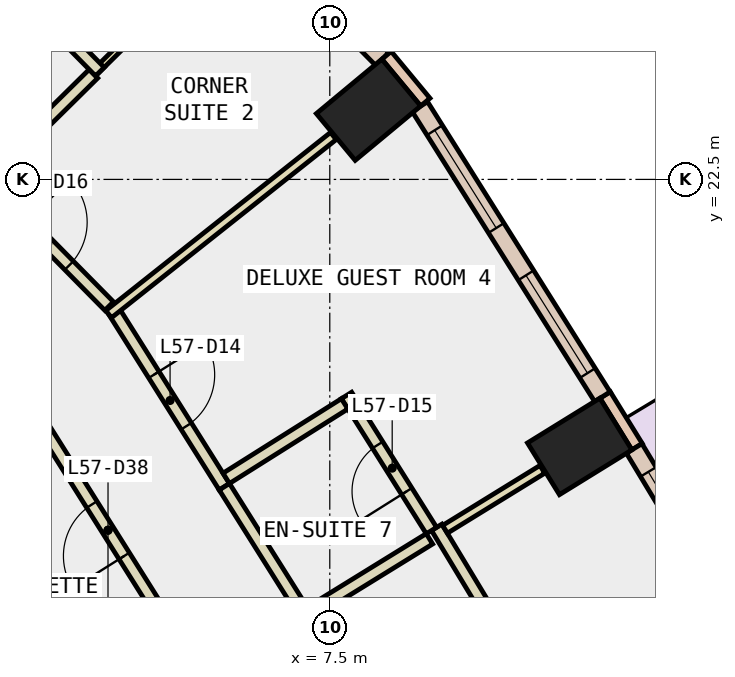
"""IFC4 building model, lengths in metres.
Left out: names, types, materials, properties, quantities, classifications, styles, units other than length and angle.
Written with IfcOpenShell. Run it as: python <this file> out.ifc"""

import sys

from ifc_helpers import new_model, si_unit, direction, frame, frame_2d, origin, origin_2d, place, context, subcontext, project, spatial, rectangle, extrude, element, fill, save


model = new_model("IFC4")
c1 = context("Model", 3, precision=1e-05, world=origin(), true_north=direction((0.0, 1.0)))
c2 = subcontext(c1, "Body", "Model", "MODEL_VIEW")
j1 = project(units=[si_unit("LENGTHUNIT", "METRE"), si_unit("PLANEANGLEUNIT", "RADIAN")], contexts=[c1])
p1 = place(None, origin())
s1 = spatial("IfcSite", under=j1, at=p1, CompositionType="ELEMENT")
p2 = place(p1, origin())
s2 = spatial("IfcBuilding", under=s1, at=p2, CompositionType="ELEMENT")
p3 = place(p2, frame((0.0, 0.0, 252.2)))
s3 = spatial("IfcBuildingStorey", under=s2, at=p3, CompositionType="ELEMENT", Elevation=252.2)
for number, where, z_axis, x_axis in (
    (1, (11.61, 18.109, -0.34), (0.0, 0.0, 1.0), (-0.526, 0.851, 0.0)),
    (2, (8.137, 23.645, -0.34), (0.0, 0.0, 1.0), (-0.639, 0.769, 0.0)),
):
    element("IfcColumn", number, at=place(p3, frame(where, z_axis=z_axis, x_axis=x_axis)), inside=s3, PredefinedType="COLUMN", context=c2, shape_type="SweptSolid", body=[
        extrude(rectangle(XDim=1.0, YDim=1.4, at=origin_2d()), origin(), (0.0, 0.0, 1.0), 3.6),
    ])
p4 = place(p3, frame((12.554, 18.104, 0.0), z_axis=(0.0, 0.0, 1.0), x_axis=(-0.525648735675, 0.850701714282, 0.0)))
e3 = element("IfcWall", 3, at=p4, inside=s3, PredefinedType="STANDARD", context=c2, shape_type="SweptSolid", body=[
    extrude(rectangle(XDim=1.0, YDim=0.2, at=frame_2d((0.5, 0.0))), origin(), (0.0, 0.0, 1.0), 3.26),
])
p5 = place(p3, frame((9.071, 23.771, 0.0), z_axis=(0.0, 0.0, 1.0), x_axis=(-0.637972365578, 0.770059257953, 0.0)))
e4 = element("IfcWall", 4, at=p5, inside=s3, PredefinedType="STANDARD", context=c2, shape_type="SweptSolid", body=[
    extrude(rectangle(XDim=1.0, YDim=0.2, at=frame_2d((0.5, 0.0))), origin(), (0.0, 0.0, 1.0), 3.26),
])
p6 = place(p3, frame((15.399, 13.277, 0.0), z_axis=(0.0, 0.0, 1.0), x_axis=(-0.516269519619, 0.856426169096, 0.0)))
e5 = element("IfcWall", 5, at=p6, inside=s3, PredefinedType="STANDARD", context=c2, shape_type="SweptSolid", body=[
    extrude(rectangle(XDim=5.603, YDim=0.3, at=frame_2d((2.802, 0.0))), origin(), (0.0, 0.0, 1.0), 3.26),
])
p7 = place(p6, frame((0.401, 0.0, 0.0)))
e6 = element("IfcOpeningElement", 6, at=p7, cuts=e5, PredefinedType="OPENING", context=c2, shape_type="SweptSolid", body=[
    extrude(rectangle(XDim=2.0, YDim=2.4, at=frame_2d((1.0, 1.2))), frame((0.0, 0.16, 0.0), z_axis=(0.0, -1.0, 0.0), x_axis=(1.0, 0.0, 0.0)), (0.0, 0.0, 1.0), 0.32),
])
p8 = place(p6, frame((3.253, 0.0, 0.9)))
e7 = element("IfcOpeningElement", 7, at=p8, cuts=e5, PredefinedType="OPENING", context=c2, shape_type="SweptSolid", body=[
    extrude(rectangle(XDim=1.9, YDim=2.0, at=frame_2d((0.95, 1.0))), frame((0.0, 0.16, 0.0), z_axis=(0.0, -1.0, 0.0), x_axis=(1.0, 0.0, 0.0)), (0.0, 0.0, 1.0), 0.32),
])
p9 = place(p3, frame((11.983, 18.926, 0.0), z_axis=(0.0, 0.0, 1.0), x_axis=(-0.532558226688, 0.846393369059, 0.0)))
e8 = element("IfcWall", 8, at=p9, inside=s3, PredefinedType="STANDARD", context=c2, shape_type="SweptSolid", body=[
    extrude(rectangle(XDim=5.637, YDim=0.3, at=frame_2d((2.818, 0.0))), origin(), (0.0, 0.0, 1.0), 3.26),
])
p10 = place(p9, frame((0.459, 0.0, 0.9)))
e9 = element("IfcOpeningElement", 9, at=p10, cuts=e8, PredefinedType="OPENING", context=c2, shape_type="SweptSolid", body=[
    extrude(rectangle(XDim=1.9, YDim=2.0, at=frame_2d((0.95, 1.0))), frame((0.0, 0.16, 0.0), z_axis=(0.0, -1.0, 0.0), x_axis=(1.0, 0.0, 0.0)), (0.0, 0.0, 1.0), 0.32),
])
p11 = place(p9, frame((3.278, 0.0, 0.9)))
e10 = element("IfcOpeningElement", 10, at=p11, cuts=e8, PredefinedType="OPENING", context=c2, shape_type="SweptSolid", body=[
    extrude(rectangle(XDim=1.9, YDim=2.0, at=frame_2d((0.95, 1.0))), frame((0.0, 0.16, 0.0), z_axis=(0.0, -1.0, 0.0), x_axis=(1.0, 0.0, 0.0)), (0.0, 0.0, 1.0), 0.32),
])
p12 = place(p3, frame((8.361, 24.48, 0.0), z_axis=(0.0, 0.0, 1.0), x_axis=(-0.702488411246, 0.711695181989, 0.0)))
e11 = element("IfcWall", 11, at=p12, inside=s3, PredefinedType="STANDARD", context=c2, shape_type="SweptSolid", body=[
    extrude(rectangle(XDim=4.137, YDim=0.3, at=frame_2d((2.068, 0.0))), origin(), (0.0, 0.0, 1.0), 3.26),
])
p13 = place(p12, frame((1.368, 0.0, 0.9)))
e12 = element("IfcOpeningElement", 12, at=p13, cuts=e11, PredefinedType="OPENING", context=c2, shape_type="SweptSolid", body=[
    extrude(rectangle(XDim=1.4, YDim=2.0, at=frame_2d((0.7, 1.0))), frame((0.0, 0.16, 0.0), z_axis=(0.0, -1.0, 0.0), x_axis=(1.0, 0.0, 0.0)), (0.0, 0.0, 1.0), 0.32),
])
p14 = place(p3, frame((5.394, 14.281, 0.0), z_axis=(0.0, 0.0, 1.0), x_axis=(-0.532551510955, 0.846397594621, 0.0)))
e13 = element("IfcWall", 13, at=p14, inside=s3, PredefinedType="PARTITIONING", context=c2, shape_type="SweptSolid", body=[
    extrude(rectangle(XDim=5.789, YDim=0.2, at=frame_2d((2.895, 0.0))), origin(), (0.0, 0.0, 1.0), 3.26),
])
p15 = place(p14, frame((2.394, 0.0, 0.0)))
e14 = element("IfcOpeningElement", 14, at=p15, cuts=e13, PredefinedType="OPENING", context=c2, shape_type="SweptSolid", body=[
    extrude(rectangle(XDim=1.0, YDim=2.1, at=frame_2d((0.5, 1.05))), frame((0.0, 0.11, 0.0), z_axis=(0.0, -1.0, 0.0), x_axis=(1.0, 0.0, 0.0)), (0.0, 0.0, 1.0), 0.22),
])
p16 = place(p3, frame((3.928, 20.367, 0.0), z_axis=(0.0, 0.0, 1.0), x_axis=(0.532616247911, -0.846356858814, 0.0)))
e15 = element("IfcWall", 15, at=p16, inside=s3, PredefinedType="PARTITIONING", context=c2, shape_type="SweptSolid", body=[
    extrude(rectangle(XDim=3.451, YDim=0.2, at=frame_2d((1.726, 0.0))), origin(), (0.0, 0.0, 1.0), 3.26),
])
p17 = place(p16, frame((1.275, 0.0, 0.0)))
e16 = element("IfcOpeningElement", 16, at=p17, cuts=e15, PredefinedType="OPENING", context=c2, shape_type="SweptSolid", body=[
    extrude(rectangle(XDim=1.0, YDim=2.1, at=frame_2d((0.5, 1.05))), frame((0.0, 0.11, 0.0), z_axis=(0.0, -1.0, 0.0), x_axis=(1.0, 0.0, 0.0)), (0.0, 0.0, 1.0), 0.22),
])
p18 = place(p3, frame((5.766, 17.446, 0.0), z_axis=(0.0, 0.0, 1.0), x_axis=(0.532437006176, -0.846469629966, 0.0)))
e17 = element("IfcWall", 17, at=p18, inside=s3, PredefinedType="PARTITIONING", context=c2, shape_type="SweptSolid", body=[
    extrude(rectangle(XDim=2.599, YDim=0.2, at=frame_2d((1.299, 0.0))), origin(), (0.0, 0.0, 1.0), 3.26),
])
p19 = place(p3, frame((1.851, 22.464, 0.0), z_axis=(0.0, 0.0, 1.0), x_axis=(0.70237969133, -0.711802479068, 0.0)))
e18 = element("IfcWall", 18, at=p19, inside=s3, PredefinedType="PARTITIONING", context=c2, shape_type="SweptSolid", body=[
    extrude(rectangle(XDim=2.876, YDim=0.2, at=frame_2d((1.438, 0.0))), origin(), (0.0, 0.0, 1.0), 3.26),
])
p20 = place(p19, frame((0.938, 0.0, 0.0)))
e19 = element("IfcOpeningElement", 19, at=p20, cuts=e18, PredefinedType="OPENING", context=c2, shape_type="SweptSolid", body=[
    extrude(rectangle(XDim=1.0, YDim=2.1, at=frame_2d((0.5, 1.05))), frame((0.0, 0.11, 0.0), z_axis=(0.0, -1.0, 0.0), x_axis=(1.0, 0.0, 0.0)), (0.0, 0.0, 1.0), 0.22),
])
p21 = place(p3, frame((10.408, 14.874, 0.0), z_axis=(0.0, 0.0, 1.0), x_axis=(-0.516768967276, 0.856124894195, 0.0)))
e20 = element("IfcWall", 20, at=p21, inside=s3, PredefinedType="PARTITIONING", context=c2, shape_type="SweptSolid", body=[
    extrude(rectangle(XDim=2.225, YDim=0.2, at=frame_2d((1.113, 0.0))), origin(), (0.0, 0.0, 1.0), 3.26),
])
p22 = place(p3, frame((9.395, 16.746, 0.0), z_axis=(0.0, 0.0, 1.0), x_axis=(0.851524542888, 0.524314745987, 0.0)))
e21 = element("IfcWall", 21, at=p22, inside=s3, PredefinedType="PARTITIONING", context=c2, shape_type="SweptSolid", body=[
    extrude(rectangle(XDim=1.88, YDim=0.15, at=frame_2d((0.94, 0.0))), origin(), (0.0, 0.0, 1.0), 3.26),
])
p23 = place(p3, frame((7.097, 15.33, 0.0), z_axis=(0.0, 0.0, 1.0), x_axis=(0.851207242031, 0.524829716302, 0.0)))
e22 = element("IfcWall", 22, at=p23, inside=s3, PredefinedType="PARTITIONING", context=c2, shape_type="SweptSolid", body=[
    extrude(rectangle(XDim=2.399, YDim=0.2, at=frame_2d((1.199, 0.0))), origin(), (0.0, 0.0, 1.0), 3.26),
])
p24 = place(p3, frame((9.172, 16.725, 0.0), z_axis=(0.0, 0.0, 1.0), x_axis=(-0.532329646536, 0.846537150643, 0.0)))
e23 = element("IfcWall", 23, at=p24, inside=s3, PredefinedType="PARTITIONING", context=c2, shape_type="SweptSolid", body=[
    extrude(rectangle(XDim=2.625, YDim=0.2, at=frame_2d((1.312, 0.0))), origin(), (0.0, 0.0, 1.0), 3.26),
])
p25 = place(p24, frame((0.763, 0.0, 0.0)))
e24 = element("IfcOpeningElement", 24, at=p25, cuts=e23, PredefinedType="OPENING", context=c2, shape_type="SweptSolid", body=[
    extrude(rectangle(XDim=0.9, YDim=2.1, at=frame_2d((0.45, 1.05))), frame((0.0, 0.11, 0.0), z_axis=(0.0, -1.0, 0.0), x_axis=(1.0, 0.0, 0.0)), (0.0, 0.0, 1.0), 0.22),
])
p26 = place(p3, frame((7.744, 18.809, 0.0), z_axis=(0.0, 0.0, 1.0), x_axis=(-0.846360434059, -0.532610566605, 0.0)))
e25 = element("IfcWall", 25, at=p26, inside=s3, PredefinedType="PARTITIONING", context=c2, shape_type="SweptSolid", body=[
    extrude(rectangle(XDim=2.3, YDim=0.2, at=frame_2d((1.15, 0.0))), origin(), (0.0, 0.0, 1.0), 3.26),
])
p27 = place(p3, frame((3.863, 20.284, 0.0), z_axis=(0.0, 0.0, 1.0), x_axis=(0.783618453885, 0.621242399335, 0.0)))
e26 = element("IfcWall", 26, at=p27, inside=s3, PredefinedType="PARTITIONING", context=c2, shape_type="SweptSolid", body=[
    extrude(rectangle(XDim=4.717, YDim=0.15, at=frame_2d((2.358, 0.0))), origin(), (0.0, 0.0, 1.0), 3.26),
])
p28 = place(p3, frame((3.613, 24.237, 0.0), z_axis=(0.0, 0.0, 1.0), x_axis=(0.711651188682, 0.702532978335, 0.0)))
e27 = element("IfcWall", 27, at=p28, inside=s3, PredefinedType="PARTITIONING", context=c2, shape_type="SweptSolid", body=[
    extrude(rectangle(XDim=3.4, YDim=0.1, at=frame_2d((1.7, 0.0))), origin(), (0.0, 0.0, 1.0), 3.26),
])
p29 = place(p28, frame((1.25, 0.0, 0.0)))
e28 = element("IfcOpeningElement", 28, at=p29, cuts=e27, PredefinedType="OPENING", context=c2, shape_type="SweptSolid", body=[
    extrude(rectangle(XDim=0.9, YDim=2.1, at=frame_2d((0.45, 1.05))), frame((0.0, 0.06, 0.0), z_axis=(0.0, -1.0, 0.0), x_axis=(1.0, 0.0, 0.0)), (0.0, 0.0, 1.0), 0.12),
])
p30 = place(p3, frame((1.798, 22.446, 0.0), z_axis=(0.0, 0.0, 1.0), x_axis=(0.711782817297, 0.702399616316, 0.0)))
e29 = element("IfcWall", 29, at=p30, inside=s3, PredefinedType="PARTITIONING", context=c2, shape_type="SweptSolid", body=[
    extrude(rectangle(XDim=2.55, YDim=0.2, at=frame_2d((1.275, 0.0))), origin(), (0.0, 0.0, 1.0), 3.26),
])
p31 = place(p3, frame((3.719, 24.272, 0.0), z_axis=(0.0, 0.0, 1.0), x_axis=(-0.70232328337, 0.711858135893, 0.0)))
e30 = element("IfcWall", 30, at=p31, inside=s3, PredefinedType="PARTITIONING", context=c2, shape_type="SweptSolid", body=[
    extrude(rectangle(XDim=3.149, YDim=0.2, at=frame_2d((1.575, 0.0))), origin(), (0.0, 0.0, 1.0), 3.26),
])
p32 = place(p8, origin())
e31 = element("IfcWindow", 31, at=p32, inside=s3, PartitioningType="SINGLE_PANEL", PredefinedType="WINDOW", context=c2, shape_type="SweptSolid", body=[
    extrude(rectangle(XDim=1.9, YDim=2.0, at=frame_2d((0.95, 1.0))), frame((0.0, 0.03, 0.0), z_axis=(0.0, -1.0, 0.0), x_axis=(1.0, 0.0, 0.0)), (0.0, 0.0, 1.0), 0.06),
])
fill(e7, e31)
p33 = place(p10, origin())
e32 = element("IfcWindow", 32, at=p33, inside=s3, PartitioningType="SINGLE_PANEL", PredefinedType="WINDOW", context=c2, shape_type="SweptSolid", body=[
    extrude(rectangle(XDim=1.9, YDim=2.0, at=frame_2d((0.95, 1.0))), frame((0.0, 0.03, 0.0), z_axis=(0.0, -1.0, 0.0), x_axis=(1.0, 0.0, 0.0)), (0.0, 0.0, 1.0), 0.06),
])
fill(e9, e32)
p34 = place(p11, origin())
e33 = element("IfcWindow", 33, at=p34, inside=s3, PartitioningType="SINGLE_PANEL", PredefinedType="WINDOW", context=c2, shape_type="SweptSolid", body=[
    extrude(rectangle(XDim=1.9, YDim=2.0, at=frame_2d((0.95, 1.0))), frame((0.0, 0.03, 0.0), z_axis=(0.0, -1.0, 0.0), x_axis=(1.0, 0.0, 0.0)), (0.0, 0.0, 1.0), 0.06),
])
fill(e10, e33)
p35 = place(p17, origin())
e34 = element("IfcDoor", 34, at=p35, inside=s3, OperationType="SINGLE_SWING_LEFT", PredefinedType="DOOR", context=c2, shape_type="SweptSolid", body=[
    extrude(rectangle(XDim=1.0, YDim=2.1, at=frame_2d((0.5, 1.05))), frame((0.0, 0.025, 0.0), z_axis=(0.0, -1.0, 0.0), x_axis=(1.0, 0.0, 0.0)), (0.0, 0.0, 1.0), 0.05),
])
fill(e16, e34)
p36 = place(p25, origin())
e35 = element("IfcDoor", 35, at=p36, inside=s3, OperationType="SINGLE_SWING_LEFT", PredefinedType="DOOR", context=c2, shape_type="SweptSolid", body=[
    extrude(rectangle(XDim=0.9, YDim=2.1, at=frame_2d((0.45, 1.05))), frame((0.0, 0.025, 0.0), z_axis=(0.0, -1.0, 0.0), x_axis=(1.0, 0.0, 0.0)), (0.0, 0.0, 1.0), 0.05),
])
fill(e24, e35)
p37 = place(p20, origin())
e36 = element("IfcDoor", 36, at=p37, inside=s3, OperationType="SINGLE_SWING_LEFT", PredefinedType="DOOR", context=c2, shape_type="SweptSolid", body=[
    extrude(rectangle(XDim=1.0, YDim=2.1, at=frame_2d((0.5, 1.05))), frame((0.0, 0.025, 0.0), z_axis=(0.0, -1.0, 0.0), x_axis=(1.0, 0.0, 0.0)), (0.0, 0.0, 1.0), 0.05),
])
fill(e19, e36)
p38 = place(p15, origin())
e37 = element("IfcDoor", 37, at=p38, inside=s3, OperationType="SINGLE_SWING_LEFT", PredefinedType="DOOR", context=c2, shape_type="SweptSolid", body=[
    extrude(rectangle(XDim=1.0, YDim=2.1, at=frame_2d((0.5, 1.05))), frame((0.0, 0.025, 0.0), z_axis=(0.0, -1.0, 0.0), x_axis=(1.0, 0.0, 0.0)), (0.0, 0.0, 1.0), 0.05),
])
fill(e14, e37)
save(model, sys.argv[1])
